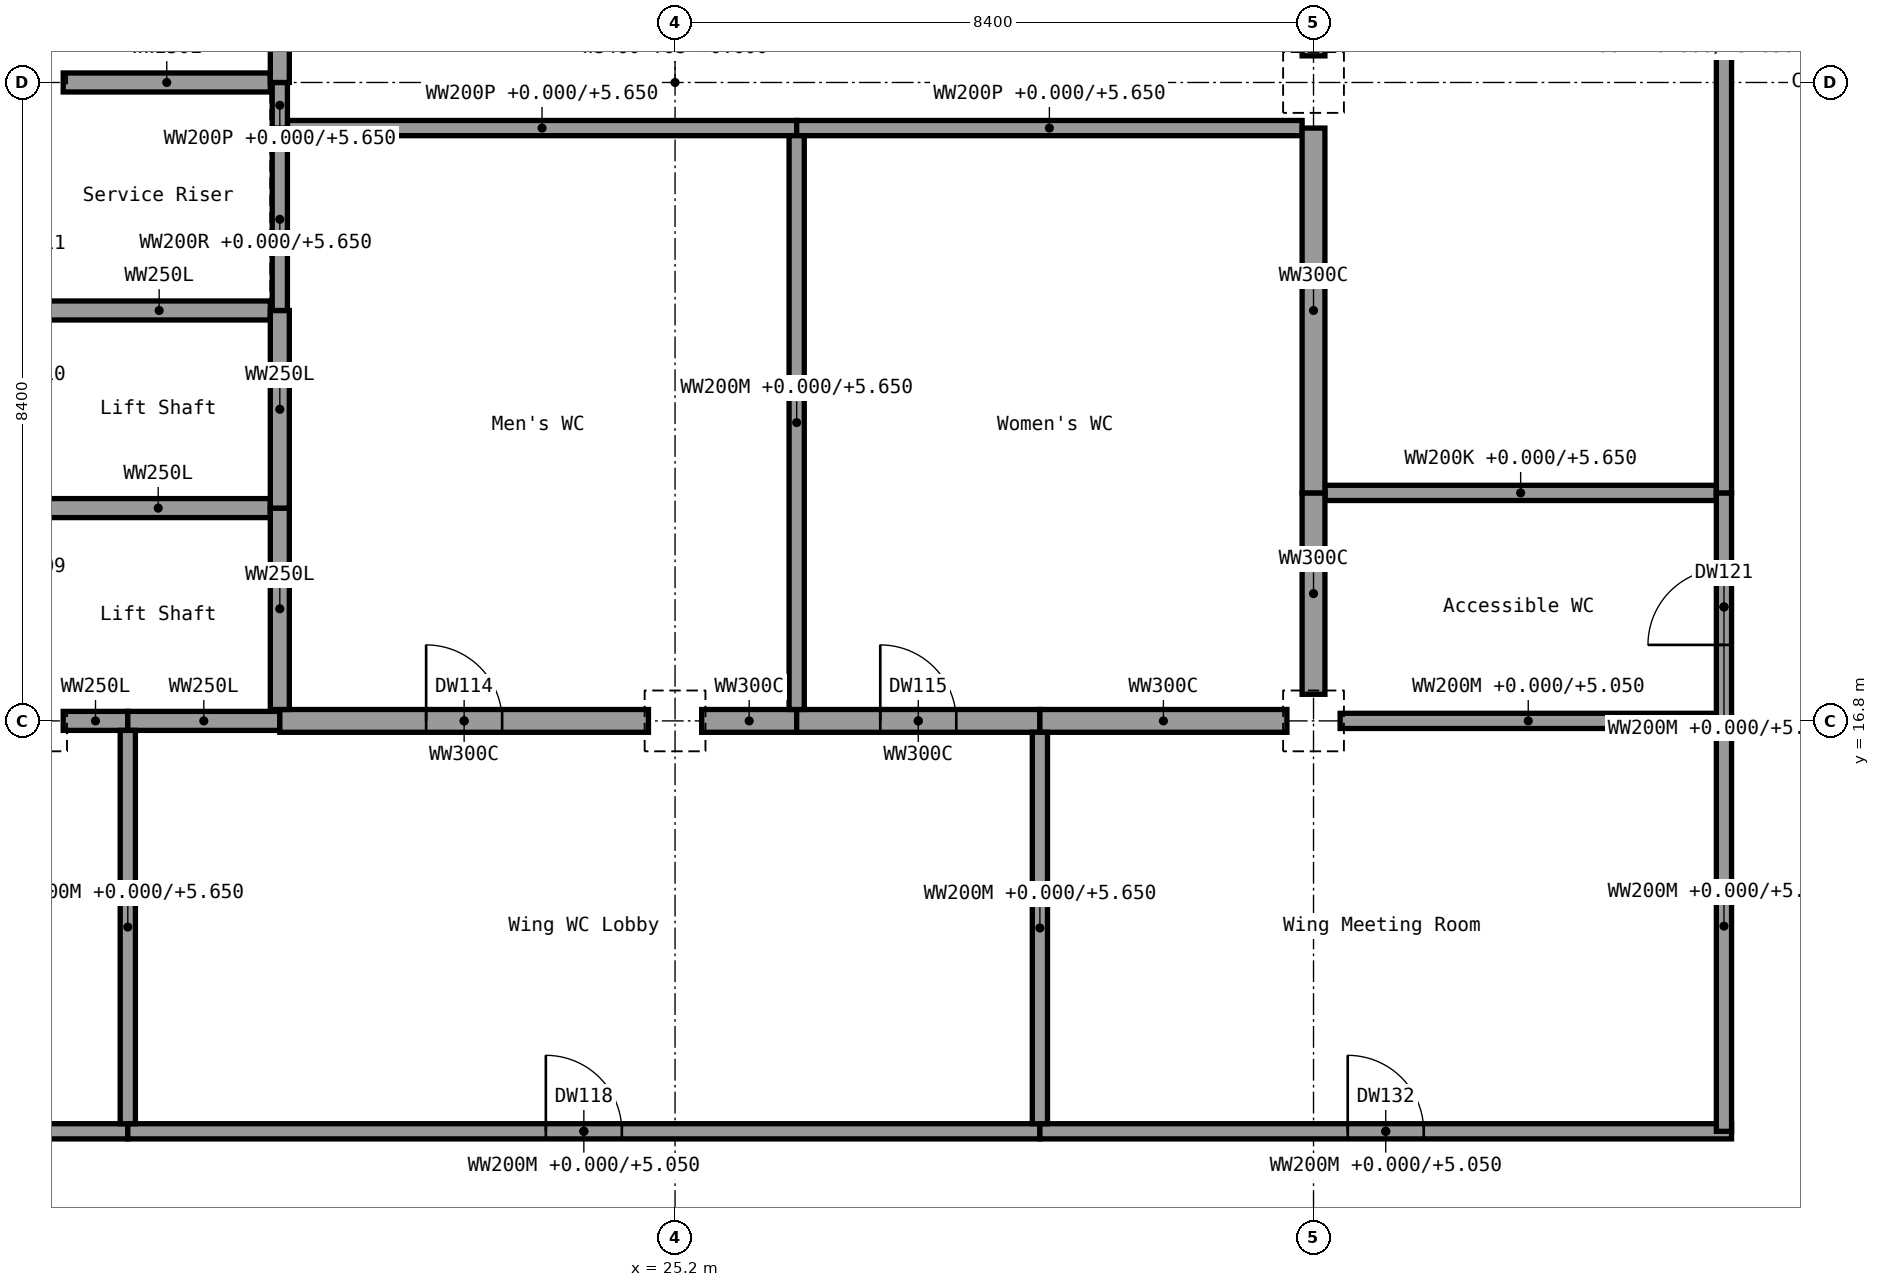
"""IFC4 building model, lengths in metres.
Left out: names, types, materials, properties, quantities, classifications, styles, units other than length and angle.
Written with IfcOpenShell. Run it as: python <this file> out.ifc"""

import sys

from ifc_helpers import new_model, si_unit, direction, frame, frame_2d, origin, origin_2d, place, context, subcontext, project, spatial, rectangle, extrude, element, fill, save


model = new_model("IFC4")
c1 = context("Model", 3, precision=1e-05, world=origin(), true_north=direction((0.0, 1.0)))
c2 = subcontext(c1, "Body", "Model", "MODEL_VIEW")
j1 = project(units=[si_unit("LENGTHUNIT", "METRE"), si_unit("PLANEANGLEUNIT", "RADIAN")], contexts=[c1])
p1 = place(None, origin())
s1 = spatial("IfcSite", under=j1, at=p1, CompositionType="ELEMENT")
p2 = place(p1, origin())
s2 = spatial("IfcBuilding", under=s1, at=p2, CompositionType="ELEMENT")
p3 = place(p2, origin())
s3 = spatial("IfcBuildingStorey", under=s2, at=p3, CompositionType="ELEMENT", Elevation=0.0)
for number, where, z_axis, x_axis in (
    (1, (16.8, 16.8, 0.0), (0.0, 0.0, 1.0), (1.0, 0.0, 0.0)),
    (2, (16.8, 25.2, 0.0), (0.0, 0.0, 1.0), (1.0, 0.0, 0.0)),
    (3, (25.2, 16.8, 0.0), (0.0, 0.0, 1.0), (1.0, 0.0, 0.0)),
    (4, (33.6, 16.8, 0.0), (0.0, 0.0, 1.0), (1.0, 0.0, 0.0)),
    (5, (33.6, 25.2, 0.0), (0.0, 0.0, 1.0), (1.0, 0.0, 0.0)),
):
    element("IfcColumn", number, at=place(p3, frame(where, z_axis=z_axis, x_axis=x_axis)), inside=s3, PredefinedType="COLUMN", context=c2, shape_type="SweptSolid", body=[
        extrude(rectangle(XDim=0.7, YDim=0.7, at=origin_2d()), origin(), (0.0, 0.0, 1.0), 6.0),
    ])
p4 = place(p3, frame((11.3, 11.4, 0.0), z_axis=(0.0, 0.0, 1.0), x_axis=(1.0, 0.0, 0.0)))
e6 = element("IfcWall", 6, at=p4, inside=s3, PredefinedType="PARTITIONING", context=c2, shape_type="SweptSolid", body=[
    extrude(rectangle(XDim=6.7, YDim=0.2, at=frame_2d((3.35, 0.0))), origin(), (0.0, 0.0, 1.0), 5.05),
])
p5 = place(p4, frame((2.85, 0.0, 0.0)))
e7 = element("IfcOpeningElement", 7, at=p5, cuts=e6, PredefinedType="OPENING", context=c2, shape_type="SweptSolid", body=[
    extrude(rectangle(XDim=1.0, YDim=2.1, at=frame_2d((0.5, 1.05))), frame((0.0, 0.1, 0.0), z_axis=(0.0, -1.0, 0.0), x_axis=(1.0, 0.0, 0.0)), (0.0, 0.0, 1.0), 0.2),
])
p6 = place(p3, frame((18.0, 11.4, 0.0), z_axis=(0.0, 0.0, 1.0), x_axis=(1.0, 0.0, 0.0)))
e8 = element("IfcWall", 8, at=p6, inside=s3, PredefinedType="PARTITIONING", context=c2, shape_type="SweptSolid", body=[
    extrude(rectangle(XDim=12.0, YDim=0.2, at=frame_2d((6.0, 0.0))), origin(), (0.0, 0.0, 1.0), 5.05),
])
p7 = place(p6, frame((5.5, 0.0, 0.0)))
e9 = element("IfcOpeningElement", 9, at=p7, cuts=e8, PredefinedType="OPENING", context=c2, shape_type="SweptSolid", body=[
    extrude(rectangle(XDim=1.0, YDim=2.1, at=frame_2d((0.5, 1.05))), frame((0.0, 0.1, 0.0), z_axis=(0.0, -1.0, 0.0), x_axis=(1.0, 0.0, 0.0)), (0.0, 0.0, 1.0), 0.2),
])
p8 = place(p3, frame((30.0, 11.4, 0.0), z_axis=(0.0, 0.0, 1.0), x_axis=(1.0, 0.0, 0.0)))
e10 = element("IfcWall", 10, at=p8, inside=s3, PredefinedType="PARTITIONING", context=c2, shape_type="SweptSolid", body=[
    extrude(rectangle(XDim=9.1, YDim=0.2, at=frame_2d((4.55, 0.0))), origin(), (0.0, 0.0, 1.0), 5.05),
])
p9 = place(p8, frame((4.05, 0.0, 0.0)))
e11 = element("IfcOpeningElement", 11, at=p9, cuts=e10, PredefinedType="OPENING", context=c2, shape_type="SweptSolid", body=[
    extrude(rectangle(XDim=1.0, YDim=2.1, at=frame_2d((0.5, 1.05))), frame((0.0, 0.1, 0.0), z_axis=(0.0, -1.0, 0.0), x_axis=(1.0, 0.0, 0.0)), (0.0, 0.0, 1.0), 0.2),
])
p10 = place(p3, frame((17.15, 16.8, 0.0), z_axis=(0.0, 0.0, 1.0), x_axis=(1.0, 0.0, 0.0)))
e12 = element("IfcWall", 12, at=p10, inside=s3, PredefinedType="SHEAR", context=c2, shape_type="SweptSolid", body=[
    extrude(rectangle(XDim=0.85, YDim=0.25, at=frame_2d((0.425, 0.0))), origin(), (0.0, 0.0, 1.0), 5.65),
])
p11 = place(p3, frame((18.0, 16.8, 0.0), z_axis=(0.0, 0.0, 1.0), x_axis=(1.0, 0.0, 0.0)))
e13 = element("IfcWall", 13, at=p11, inside=s3, PredefinedType="SHEAR", context=c2, shape_type="SweptSolid", body=[
    extrude(rectangle(XDim=2.0, YDim=0.25, at=frame_2d((1.0, 0.0))), origin(), (0.0, 0.0, 1.0), 5.65),
])
p12 = place(p3, frame((20.0, 16.8, 0.0), z_axis=(0.0, 0.0, 1.0), x_axis=(1.0, 0.0, 0.0)))
e14 = element("IfcWall", 14, at=p12, inside=s3, PredefinedType="SHEAR", context=c2, shape_type="SweptSolid", body=[
    extrude(rectangle(XDim=4.85, YDim=0.3, at=frame_2d((2.425, 0.0))), origin(), (0.0, 0.0, 1.0), 5.65),
])
p13 = place(p12, frame((1.925, 0.0, 0.0)))
e15 = element("IfcOpeningElement", 15, at=p13, cuts=e14, PredefinedType="OPENING", context=c2, shape_type="SweptSolid", body=[
    extrude(rectangle(XDim=1.0, YDim=2.1, at=frame_2d((0.5, 1.05))), frame((0.0, 0.15, 0.0), z_axis=(0.0, -1.0, 0.0), x_axis=(1.0, 0.0, 0.0)), (0.0, 0.0, 1.0), 0.3),
])
p14 = place(p3, frame((25.55, 16.8, 0.0), z_axis=(0.0, 0.0, 1.0), x_axis=(1.0, 0.0, 0.0)))
e16 = element("IfcWall", 16, at=p14, inside=s3, PredefinedType="SHEAR", context=c2, shape_type="SweptSolid", body=[
    extrude(rectangle(XDim=1.25, YDim=0.3, at=frame_2d((0.625, 0.0))), origin(), (0.0, 0.0, 1.0), 5.65),
])
p15 = place(p3, frame((26.8, 16.8, 0.0), z_axis=(0.0, 0.0, 1.0), x_axis=(1.0, 0.0, 0.0)))
e17 = element("IfcWall", 17, at=p15, inside=s3, PredefinedType="SHEAR", context=c2, shape_type="SweptSolid", body=[
    extrude(rectangle(XDim=3.2, YDim=0.3, at=frame_2d((1.6, 0.0))), origin(), (0.0, 0.0, 1.0), 5.65),
])
p16 = place(p15, frame((1.1, 0.0, 0.0)))
e18 = element("IfcOpeningElement", 18, at=p16, cuts=e17, PredefinedType="OPENING", context=c2, shape_type="SweptSolid", body=[
    extrude(rectangle(XDim=1.0, YDim=2.1, at=frame_2d((0.5, 1.05))), frame((0.0, 0.15, 0.0), z_axis=(0.0, -1.0, 0.0), x_axis=(1.0, 0.0, 0.0)), (0.0, 0.0, 1.0), 0.3),
])
p17 = place(p3, frame((30.0, 16.8, 0.0), z_axis=(0.0, 0.0, 1.0), x_axis=(1.0, 0.0, 0.0)))
e19 = element("IfcWall", 19, at=p17, inside=s3, PredefinedType="SHEAR", context=c2, shape_type="SweptSolid", body=[
    extrude(rectangle(XDim=3.25, YDim=0.3, at=frame_2d((1.625, 0.0))), origin(), (0.0, 0.0, 1.0), 5.65),
])
p18 = place(p3, frame((33.95, 16.8, 0.0), z_axis=(0.0, 0.0, 1.0), x_axis=(1.0, 0.0, 0.0)))
e20 = element("IfcWall", 20, at=p18, inside=s3, PredefinedType="PARTITIONING", context=c2, shape_type="SweptSolid", body=[
    extrude(rectangle(XDim=4.95, YDim=0.2, at=frame_2d((2.475, 0.0))), origin(), (0.0, 0.0, 1.0), 5.05),
])
p19 = place(p3, frame((16.925, 19.6, 0.0), z_axis=(0.0, 0.0, 1.0), x_axis=(1.0, 0.0, 0.0)))
e21 = element("IfcWall", 21, at=p19, inside=s3, PredefinedType="SHEAR", context=c2, shape_type="SweptSolid", body=[
    extrude(rectangle(XDim=2.95, YDim=0.25, at=frame_2d((1.475, 0.0))), origin(), (0.0, 0.0, 1.0), 5.65),
])
p20 = place(p3, frame((33.75, 19.8, 0.0), z_axis=(0.0, 0.0, 1.0), x_axis=(1.0, 0.0, 0.0)))
e22 = element("IfcWall", 22, at=p20, inside=s3, PredefinedType="SOLIDWALL", context=c2, shape_type="SweptSolid", body=[
    extrude(rectangle(XDim=5.15, YDim=0.2, at=frame_2d((2.575, 0.0))), origin(), (0.0, 0.0, 1.0), 5.65),
])
p21 = place(p3, frame((16.95, 22.2, 0.0), z_axis=(0.0, 0.0, 1.0), x_axis=(1.0, 0.0, 0.0)))
e23 = element("IfcWall", 23, at=p21, inside=s3, PredefinedType="SHEAR", context=c2, shape_type="SweptSolid", body=[
    extrude(rectangle(XDim=2.925, YDim=0.25, at=frame_2d((1.462, 0.0))), origin(), (0.0, 0.0, 1.0), 5.65),
])
p22 = place(p3, frame((20.1, 24.6, 0.0), z_axis=(0.0, 0.0, 1.0), x_axis=(1.0, 0.0, 0.0)))
e24 = element("IfcWall", 24, at=p22, inside=s3, PredefinedType="SOLIDWALL", context=c2, shape_type="SweptSolid", body=[
    extrude(rectangle(XDim=6.7, YDim=0.2, at=frame_2d((3.35, 0.0))), origin(), (0.0, 0.0, 1.0), 5.65),
])
p23 = place(p3, frame((26.8, 24.6, 0.0), z_axis=(0.0, 0.0, 1.0), x_axis=(1.0, 0.0, 0.0)))
e25 = element("IfcWall", 25, at=p23, inside=s3, PredefinedType="SOLIDWALL", context=c2, shape_type="SweptSolid", body=[
    extrude(rectangle(XDim=6.65, YDim=0.2, at=frame_2d((3.325, 0.0))), origin(), (0.0, 0.0, 1.0), 5.65),
])
p24 = place(p3, frame((17.15, 25.2, 0.0), z_axis=(0.0, 0.0, 1.0), x_axis=(1.0, 0.0, 0.0)))
e26 = element("IfcWall", 26, at=p24, inside=s3, PredefinedType="SHEAR", context=c2, shape_type="SweptSolid", body=[
    extrude(rectangle(XDim=2.725, YDim=0.25, at=frame_2d((1.363, 0.0))), origin(), (0.0, 0.0, 1.0), 5.65),
])
p25 = place(p3, frame((18.0, 11.5, 0.0), z_axis=(0.0, 0.0, 1.0), x_axis=(0.0, 1.0, 0.0)))
e27 = element("IfcWall", 27, at=p25, inside=s3, PredefinedType="PARTITIONING", context=c2, shape_type="SweptSolid", body=[
    extrude(rectangle(XDim=5.175, YDim=0.2, at=frame_2d((2.587, 0.0))), origin(), (0.0, 0.0, 1.0), 5.65),
])
p26 = place(p3, frame((20.0, 16.95, 0.0), z_axis=(0.0, 0.0, 1.0), x_axis=(0.0, 1.0, 0.0)))
e28 = element("IfcWall", 28, at=p26, inside=s3, PredefinedType="SHEAR", context=c2, shape_type="SweptSolid", body=[
    extrude(rectangle(XDim=2.65, YDim=0.25, at=frame_2d((1.325, 0.0))), origin(), (0.0, 0.0, 1.0), 5.65),
])
p27 = place(p3, frame((20.0, 19.6, 0.0), z_axis=(0.0, 0.0, 1.0), x_axis=(0.0, 1.0, 0.0)))
e29 = element("IfcWall", 29, at=p27, inside=s3, PredefinedType="SHEAR", context=c2, shape_type="SweptSolid", body=[
    extrude(rectangle(XDim=2.6, YDim=0.25, at=frame_2d((1.3, 0.0))), origin(), (0.0, 0.0, 1.0), 5.65),
])
p28 = place(p3, frame((20.0, 22.2, 0.0), z_axis=(0.0, 0.0, 1.0), x_axis=(0.0, 1.0, 0.0)))
e30 = element("IfcWall", 30, at=p28, inside=s3, PredefinedType="SOLIDWALL", context=c2, shape_type="SweptSolid", body=[
    extrude(rectangle(XDim=2.4, YDim=0.2, at=frame_2d((1.2, 0.0))), origin(), (0.0, 0.0, 1.0), 5.65),
])
p29 = place(p3, frame((20.0, 24.6, 0.0), z_axis=(0.0, 0.0, 1.0), x_axis=(0.0, 1.0, 0.0)))
e31 = element("IfcWall", 31, at=p29, inside=s3, PredefinedType="SOLIDWALL", context=c2, shape_type="SweptSolid", body=[
    extrude(rectangle(XDim=0.6, YDim=0.2, at=frame_2d((0.3, 0.0))), origin(), (0.0, 0.0, 1.0), 5.65),
])
p30 = place(p3, frame((20.0, 25.2, 0.0), z_axis=(0.0, 0.0, 1.0), x_axis=(0.0, 1.0, 0.0)))
e32 = element("IfcWall", 32, at=p30, inside=s3, PredefinedType="SHEAR", context=c2, shape_type="SweptSolid", body=[
    extrude(rectangle(XDim=2.6, YDim=0.25, at=frame_2d((1.3, 0.0))), origin(), (0.0, 0.0, 1.0), 5.65),
])
p31 = place(p3, frame((26.8, 16.95, 0.0), z_axis=(0.0, 0.0, 1.0), x_axis=(0.0, 1.0, 0.0)))
e33 = element("IfcWall", 33, at=p31, inside=s3, PredefinedType="PARTITIONING", context=c2, shape_type="SweptSolid", body=[
    extrude(rectangle(XDim=7.55, YDim=0.2, at=frame_2d((3.775, 0.0))), origin(), (0.0, 0.0, 1.0), 5.65),
])
p32 = place(p3, frame((30.0, 11.5, 0.0), z_axis=(0.0, 0.0, 1.0), x_axis=(0.0, 1.0, 0.0)))
e34 = element("IfcWall", 34, at=p32, inside=s3, PredefinedType="PARTITIONING", context=c2, shape_type="SweptSolid", body=[
    extrude(rectangle(XDim=5.15, YDim=0.2, at=frame_2d((2.575, 0.0))), origin(), (0.0, 0.0, 1.0), 5.65),
])
p33 = place(p3, frame((33.6, 17.15, 0.0), z_axis=(0.0, 0.0, 1.0), x_axis=(0.0, 1.0, 0.0)))
e35 = element("IfcWall", 35, at=p33, inside=s3, PredefinedType="SHEAR", context=c2, shape_type="SweptSolid", body=[
    extrude(rectangle(XDim=2.65, YDim=0.3, at=frame_2d((1.325, 0.0))), origin(), (0.0, 0.0, 1.0), 5.65),
])
p34 = place(p3, frame((33.6, 19.8, 0.0), z_axis=(0.0, 0.0, 1.0), x_axis=(0.0, 1.0, 0.0)))
e36 = element("IfcWall", 36, at=p34, inside=s3, PredefinedType="SHEAR", context=c2, shape_type="SweptSolid", body=[
    extrude(rectangle(XDim=4.8, YDim=0.3, at=frame_2d((2.4, 0.0))), origin(), (0.0, 0.0, 1.0), 5.65),
])
p35 = place(p3, frame((33.6, 25.55, 0.0), z_axis=(0.0, 0.0, 1.0), x_axis=(0.0, 1.0, 0.0)))
e37 = element("IfcWall", 37, at=p35, inside=s3, PredefinedType="SHEAR", context=c2, shape_type="SweptSolid", body=[
    extrude(rectangle(XDim=7.7, YDim=0.3, at=frame_2d((3.85, 0.0))), origin(), (0.0, 0.0, 1.0), 5.65),
])
p36 = place(p3, frame((39.0, 11.4, 0.0), z_axis=(0.0, 0.0, 1.0), x_axis=(0.0, 1.0, 0.0)))
e38 = element("IfcWall", 38, at=p36, inside=s3, PredefinedType="PARTITIONING", context=c2, shape_type="SweptSolid", body=[
    extrude(rectangle(XDim=5.4, YDim=0.2, at=frame_2d((2.7, 0.0))), origin(), (0.0, 0.0, 1.0), 5.05),
])
p37 = place(p3, frame((39.0, 16.8, 0.0), z_axis=(0.0, 0.0, 1.0), x_axis=(0.0, 1.0, 0.0)))
e39 = element("IfcWall", 39, at=p37, inside=s3, PredefinedType="PARTITIONING", context=c2, shape_type="SweptSolid", body=[
    extrude(rectangle(XDim=3.0, YDim=0.2, at=frame_2d((1.5, 0.0))), origin(), (0.0, 0.0, 1.0), 5.05),
])
p38 = place(p37, frame((1.0, 0.0, 0.0)))
e40 = element("IfcOpeningElement", 40, at=p38, cuts=e39, PredefinedType="OPENING", context=c2, shape_type="SweptSolid", body=[
    extrude(rectangle(XDim=1.0, YDim=2.1, at=frame_2d((0.5, 1.05))), frame((0.0, 0.1, 0.0), z_axis=(0.0, -1.0, 0.0), x_axis=(1.0, 0.0, 0.0)), (0.0, 0.0, 1.0), 0.2),
])
p39 = place(p3, frame((39.0, 19.8, 0.0), z_axis=(0.0, 0.0, 1.0), x_axis=(0.0, 1.0, 0.0)))
e41 = element("IfcWall", 41, at=p39, inside=s3, PredefinedType="SOLIDWALL", context=c2, shape_type="SweptSolid", body=[
    extrude(rectangle(XDim=13.8, YDim=0.2, at=frame_2d((6.9, 0.0))), origin(), (0.0, 0.0, 1.0), 5.05),
])
p40 = place(p39, frame((6.4, 0.0, 0.0)))
e42 = element("IfcOpeningElement", 42, at=p40, cuts=e41, PredefinedType="OPENING", context=c2, shape_type="SweptSolid", body=[
    extrude(rectangle(XDim=1.0, YDim=2.1, at=frame_2d((0.5, 1.05))), frame((0.0, 0.1, 0.0), z_axis=(0.0, -1.0, 0.0), x_axis=(1.0, 0.0, 0.0)), (0.0, 0.0, 1.0), 0.2),
])
p41 = place(p13, origin())
e43 = element("IfcDoor", 43, at=p41, inside=s3, OperationType="SINGLE_SWING_LEFT", PredefinedType="DOOR", context=c2, shape_type="SweptSolid", body=[
    extrude(rectangle(XDim=1.0, YDim=2.1, at=frame_2d((0.5, 1.05))), frame((0.0, 0.025, 0.0), z_axis=(0.0, -1.0, 0.0), x_axis=(1.0, 0.0, 0.0)), (0.0, 0.0, 1.0), 0.05),
])
fill(e15, e43)
p42 = place(p16, origin())
e44 = element("IfcDoor", 44, at=p42, inside=s3, OperationType="SINGLE_SWING_LEFT", PredefinedType="DOOR", context=c2, shape_type="SweptSolid", body=[
    extrude(rectangle(XDim=1.0, YDim=2.1, at=frame_2d((0.5, 1.05))), frame((0.0, 0.025, 0.0), z_axis=(0.0, -1.0, 0.0), x_axis=(1.0, 0.0, 0.0)), (0.0, 0.0, 1.0), 0.05),
])
fill(e18, e44)
p43 = place(p7, origin())
e45 = element("IfcDoor", 45, at=p43, inside=s3, OperationType="SINGLE_SWING_LEFT", PredefinedType="DOOR", context=c2, shape_type="SweptSolid", body=[
    extrude(rectangle(XDim=1.0, YDim=2.1, at=frame_2d((0.5, 1.05))), frame((0.0, 0.025, 0.0), z_axis=(0.0, -1.0, 0.0), x_axis=(1.0, 0.0, 0.0)), (0.0, 0.0, 1.0), 0.05),
])
fill(e9, e45)
p44 = place(p38, origin())
e46 = element("IfcDoor", 46, at=p44, inside=s3, OperationType="SINGLE_SWING_LEFT", PredefinedType="DOOR", context=c2, shape_type="SweptSolid", body=[
    extrude(rectangle(XDim=1.0, YDim=2.1, at=frame_2d((0.5, 1.05))), frame((0.0, 0.025, 0.0), z_axis=(0.0, -1.0, 0.0), x_axis=(1.0, 0.0, 0.0)), (0.0, 0.0, 1.0), 0.05),
])
fill(e40, e46)
p45 = place(p9, origin())
e47 = element("IfcDoor", 47, at=p45, inside=s3, OperationType="SINGLE_SWING_LEFT", PredefinedType="DOOR", context=c2, shape_type="SweptSolid", body=[
    extrude(rectangle(XDim=1.0, YDim=2.1, at=frame_2d((0.5, 1.05))), frame((0.0, 0.025, 0.0), z_axis=(0.0, -1.0, 0.0), x_axis=(1.0, 0.0, 0.0)), (0.0, 0.0, 1.0), 0.05),
])
fill(e11, e47)
save(model, sys.argv[1])
